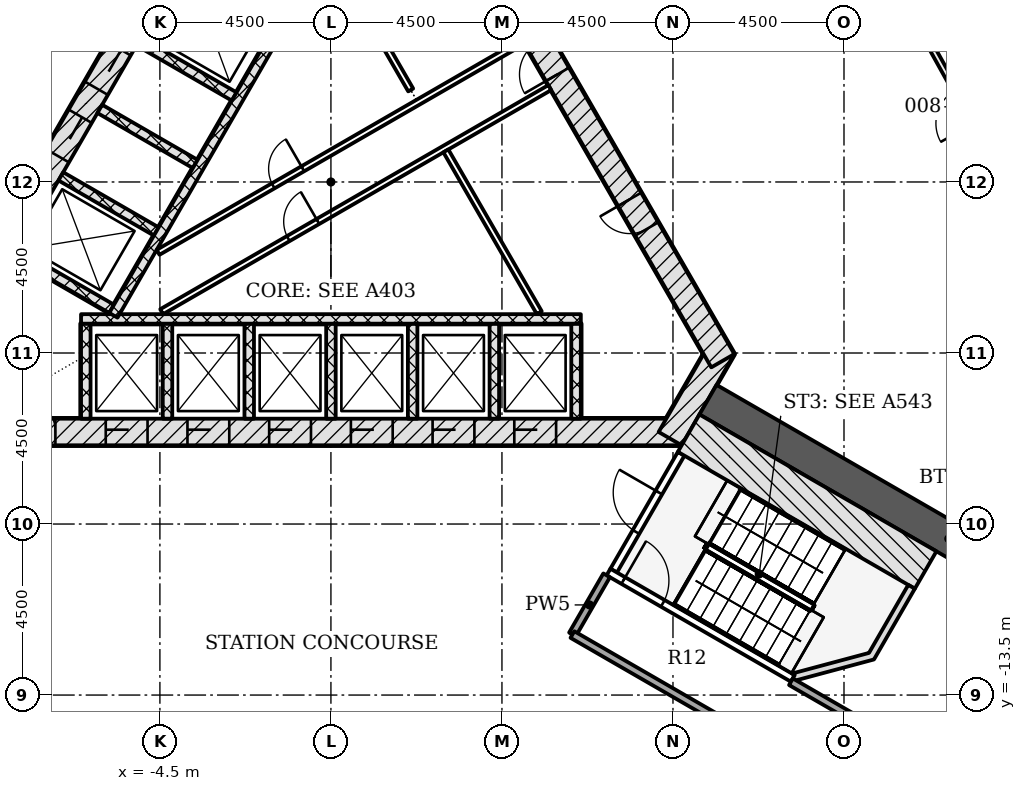
"""IFC4 building model, lengths in metres.
Left out: names, types, materials, properties, quantities, classifications, styles, units other than length and angle.
Written with IfcOpenShell. Run it as: python <this file> out.ifc"""

import sys

from ifc_helpers import new_model, si_unit, direction, frame, frame_2d, origin, place, context, subcontext, project, spatial, polyline, rectangle, outline, extrude, element, fill, save


model = new_model("IFC4")
c1 = context("Model", 3, precision=1e-05, world=origin(), true_north=direction((0.0, 1.0)))
c2 = subcontext(c1, "Body", "Model", "MODEL_VIEW")
j1 = project(units=[si_unit("LENGTHUNIT", "METRE"), si_unit("PLANEANGLEUNIT", "RADIAN")], contexts=[c1])
p1 = place(None, origin())
s1 = spatial("IfcSite", under=j1, at=p1, CompositionType="ELEMENT")
p2 = place(p1, origin())
s2 = spatial("IfcBuilding", under=s1, at=p2, CompositionType="ELEMENT")
p3 = place(p2, origin())
s3 = spatial("IfcBuildingStorey", under=s2, at=p3, CompositionType="ELEMENT", Elevation=0.0)
p4 = place(p3, frame((-9.229, -6.578, -0.25), z_axis=(0.0, 0.0, 1.0), x_axis=(1.0, 0.0, 0.0)))
e1 = element("IfcWall", 1, at=p4, inside=s3, PredefinedType="SHEAR", context=c2, shape_type="SweptSolid", body=[
    extrude(rectangle(XDim=18.458, YDim=0.7, at=frame_2d((9.229, 0.0))), origin(), (0.0, 0.0, 1.0), 6.0),
])
p5 = place(p4, frame((3.304, 0.0, 0.25)))
e2 = element("IfcOpeningElement", 2, at=p5, cuts=e1, PredefinedType="OPENING", context=c2, shape_type="SweptSolid", body=[
    extrude(rectangle(XDim=1.1, YDim=2.1, at=frame_2d((0.55, 1.05))), frame((0.0, 0.36, 0.0), z_axis=(0.0, -1.0, 0.0), x_axis=(1.0, 0.0, 0.0)), (0.0, 0.0, 1.0), 0.72),
])
p6 = place(p4, frame((5.454, 0.0, 0.25)))
e3 = element("IfcOpeningElement", 3, at=p6, cuts=e1, PredefinedType="OPENING", context=c2, shape_type="SweptSolid", body=[
    extrude(rectangle(XDim=1.1, YDim=2.1, at=frame_2d((0.55, 1.05))), frame((0.0, 0.36, 0.0), z_axis=(0.0, -1.0, 0.0), x_axis=(1.0, 0.0, 0.0)), (0.0, 0.0, 1.0), 0.72),
])
p7 = place(p4, frame((7.604, 0.0, 0.25)))
e4 = element("IfcOpeningElement", 4, at=p7, cuts=e1, PredefinedType="OPENING", context=c2, shape_type="SweptSolid", body=[
    extrude(rectangle(XDim=1.1, YDim=2.1, at=frame_2d((0.55, 1.05))), frame((0.0, 0.36, 0.0), z_axis=(0.0, -1.0, 0.0), x_axis=(1.0, 0.0, 0.0)), (0.0, 0.0, 1.0), 0.72),
])
p8 = place(p4, frame((9.754, 0.0, 0.25)))
e5 = element("IfcOpeningElement", 5, at=p8, cuts=e1, PredefinedType="OPENING", context=c2, shape_type="SweptSolid", body=[
    extrude(rectangle(XDim=1.1, YDim=2.1, at=frame_2d((0.55, 1.05))), frame((0.0, 0.36, 0.0), z_axis=(0.0, -1.0, 0.0), x_axis=(1.0, 0.0, 0.0)), (0.0, 0.0, 1.0), 0.72),
])
p9 = place(p4, frame((11.904, 0.0, 0.25)))
e6 = element("IfcOpeningElement", 6, at=p9, cuts=e1, PredefinedType="OPENING", context=c2, shape_type="SweptSolid", body=[
    extrude(rectangle(XDim=1.1, YDim=2.1, at=frame_2d((0.55, 1.05))), frame((0.0, 0.36, 0.0), z_axis=(0.0, -1.0, 0.0), x_axis=(1.0, 0.0, 0.0)), (0.0, 0.0, 1.0), 0.72),
])
p10 = place(p4, frame((14.054, 0.0, 0.25)))
e7 = element("IfcOpeningElement", 7, at=p10, cuts=e1, PredefinedType="OPENING", context=c2, shape_type="SweptSolid", body=[
    extrude(rectangle(XDim=1.1, YDim=2.1, at=frame_2d((0.55, 1.05))), frame((0.0, 0.36, 0.0), z_axis=(0.0, -1.0, 0.0), x_axis=(1.0, 0.0, 0.0)), (0.0, 0.0, 1.0), 0.72),
])
p11 = place(p4, frame((1.079, 0.0, 0.25)))
e8 = element("IfcOpeningElement", 8, at=p11, cuts=e1, PredefinedType="OPENING", context=c2, shape_type="SweptSolid", body=[
    extrude(rectangle(XDim=0.9, YDim=2.1, at=frame_2d((0.45, 1.05))), frame((0.0, 0.36, 0.0), z_axis=(0.0, -1.0, 0.0), x_axis=(1.0, 0.0, 0.0)), (0.0, 0.0, 1.0), 0.72),
])
p12 = place(p3, frame((8.926, -6.753, -0.25), z_axis=(0.0, 0.0, 1.0), x_axis=(0.500042739161, 0.866000726912, 0.0)))
e9 = element("IfcWall", 9, at=p12, inside=s3, PredefinedType="SHEAR", context=c2, shape_type="SweptSolid", body=[
    extrude(rectangle(XDim=2.771, YDim=0.7, at=frame_2d((1.386, 0.0))), origin(), (0.0, 0.0, 1.0), 6.0),
])
p13 = place(p3, frame((10.311, -4.703, -0.25), z_axis=(0.0, 0.0, 1.0), x_axis=(-0.500001446645, 0.866024568562, 0.0)))
e10 = element("IfcWall", 10, at=p13, inside=s3, PredefinedType="SHEAR", context=c2, shape_type="SweptSolid", body=[
    extrude(rectangle(XDim=18.458, YDim=0.7, at=frame_2d((9.229, 0.0))), origin(), (0.0, 0.0, 1.0), 6.0),
])
p14 = place(p13, frame((8.7, 0.0, 0.25)))
e11 = element("IfcOpeningElement", 11, at=p14, cuts=e10, PredefinedType="OPENING", context=c2, shape_type="SweptSolid", body=[
    extrude(rectangle(XDim=1.0, YDim=2.1, at=frame_2d((0.5, 1.05))), frame((0.0, 0.36, 0.0), z_axis=(0.0, -1.0, 0.0), x_axis=(1.0, 0.0, 0.0)), (0.0, 0.0, 1.0), 0.72),
])
p15 = place(p13, frame((4.002, 0.0, 0.25)))
e12 = element("IfcOpeningElement", 12, at=p15, cuts=e10, PredefinedType="OPENING", context=c2, shape_type="SweptSolid", body=[
    extrude(rectangle(XDim=0.9, YDim=2.1, at=frame_2d((0.45, 1.05))), frame((0.0, 0.36, 0.0), z_axis=(0.0, -1.0, 0.0), x_axis=(1.0, 0.0, 0.0)), (0.0, 0.0, 1.0), 0.72),
])
p16 = place(p13, frame((14.093, 0.0, 0.25)))
e13 = element("IfcOpeningElement", 13, at=p16, cuts=e10, PredefinedType="OPENING", context=c2, shape_type="SweptSolid", body=[
    extrude(rectangle(XDim=0.9, YDim=2.1, at=frame_2d((0.45, 1.05))), frame((0.0, 0.36, 0.0), z_axis=(0.0, -1.0, 0.0), x_axis=(1.0, 0.0, 0.0)), (0.0, 0.0, 1.0), 0.72),
])
p17 = place(p3, frame((-1.083, 11.281, -0.25), z_axis=(0.0, 0.0, 1.0), x_axis=(-0.500001446645, -0.866024568562, 0.0)))
e14 = element("IfcWall", 14, at=p17, inside=s3, PredefinedType="SHEAR", context=c2, shape_type="SweptSolid", body=[
    extrude(rectangle(XDim=18.458, YDim=0.7, at=frame_2d((9.229, 0.0))), origin(), (0.0, 0.0, 1.0), 6.0),
])
p18 = place(p17, frame((4.029, 0.0, 0.25)))
e15 = element("IfcOpeningElement", 15, at=p18, cuts=e14, PredefinedType="OPENING", context=c2, shape_type="SweptSolid", body=[
    extrude(rectangle(XDim=1.4, YDim=2.1, at=frame_2d((0.7, 1.05))), frame((0.0, 0.36, 0.0), z_axis=(0.0, -1.0, 0.0), x_axis=(1.0, 0.0, 0.0)), (0.0, 0.0, 1.0), 0.72),
])
p19 = place(p17, frame((6.579, 0.0, 0.25)))
e16 = element("IfcOpeningElement", 16, at=p19, cuts=e14, PredefinedType="OPENING", context=c2, shape_type="SweptSolid", body=[
    extrude(rectangle(XDim=1.4, YDim=2.1, at=frame_2d((0.7, 1.05))), frame((0.0, 0.36, 0.0), z_axis=(0.0, -1.0, 0.0), x_axis=(1.0, 0.0, 0.0)), (0.0, 0.0, 1.0), 0.72),
])
p20 = place(p17, frame((8.979, 0.0, 0.25)))
e17 = element("IfcOpeningElement", 17, at=p20, cuts=e14, PredefinedType="OPENING", context=c2, shape_type="SweptSolid", body=[
    extrude(rectangle(XDim=1.2, YDim=2.1, at=frame_2d((0.6, 1.05))), frame((0.0, 0.36, 0.0), z_axis=(0.0, -1.0, 0.0), x_axis=(1.0, 0.0, 0.0)), (0.0, 0.0, 1.0), 0.72),
])
p21 = place(p17, frame((11.029, 0.0, 0.25)))
e18 = element("IfcOpeningElement", 18, at=p21, cuts=e14, PredefinedType="OPENING", context=c2, shape_type="SweptSolid", body=[
    extrude(rectangle(XDim=1.2, YDim=2.1, at=frame_2d((0.6, 1.05))), frame((0.0, 0.36, 0.0), z_axis=(0.0, -1.0, 0.0), x_axis=(1.0, 0.0, 0.0)), (0.0, 0.0, 1.0), 0.72),
])
p22 = place(p17, frame((13.179, 0.0, 0.25)))
e19 = element("IfcOpeningElement", 19, at=p22, cuts=e14, PredefinedType="OPENING", context=c2, shape_type="SweptSolid", body=[
    extrude(rectangle(XDim=1.3, YDim=2.1, at=frame_2d((0.65, 1.05))), frame((0.0, 0.36, 0.0), z_axis=(0.0, -1.0, 0.0), x_axis=(1.0, 0.0, 0.0)), (0.0, 0.0, 1.0), 0.72),
])
p23 = place(p3, frame((9.922, -5.728, -0.25), z_axis=(0.0, 0.0, 1.0), x_axis=(0.866028046028, -0.499995423472, 0.0)))
e20 = element("IfcWall", 20, at=p23, inside=s3, PredefinedType="SHEAR", context=c2, shape_type="SweptSolid", body=[
    extrude(rectangle(XDim=14.633, YDim=0.9, at=frame_2d((7.316, 0.0))), origin(), (0.0, 0.0, 1.0), 6.0),
])
for number, where, z_axis, x_axis in (
    (21, (-6.45, -6.228, -0.25), (0.0, 0.0, 1.0), (0.0, 1.0, 0.0)),
    (22, (-4.3, -6.228, -0.25), (0.0, 0.0, 1.0), (0.0, 1.0, 0.0)),
    (23, (-2.15, -6.228, -0.25), (0.0, 0.0, 1.0), (0.0, 1.0, 0.0)),
    (24, (0.0, -6.228, -0.25), (0.0, 0.0, 1.0), (0.0, 1.0, 0.0)),
    (25, (2.15, -6.228, -0.25), (0.0, 0.0, 1.0), (0.0, 1.0, 0.0)),
    (26, (4.3, -6.228, -0.25), (0.0, 0.0, 1.0), (0.0, 1.0, 0.0)),
    (27, (6.45, -6.228, -0.25), (0.0, 0.0, 1.0), (0.0, 1.0, 0.0)),
):
    element("IfcWall", number, at=place(p3, frame(where, z_axis=z_axis, x_axis=x_axis)), inside=s3, PredefinedType="PARTITIONING", context=c2, shape_type="SweptSolid", body=[
        extrude(rectangle(XDim=2.5, YDim=0.25, at=frame_2d((1.25, 0.0))), origin(), (0.0, 0.0, 1.0), 6.0),
    ])
p24 = place(p3, frame((-6.575, -3.603, 0.0), z_axis=(0.0, 0.0, 1.0), x_axis=(1.0, 0.0, 0.0)))
e28 = element("IfcWall", 28, at=p24, inside=s3, PredefinedType="PARTITIONING", context=c2, shape_type="SweptSolid", body=[
    extrude(rectangle(XDim=13.15, YDim=0.25, at=frame_2d((6.575, 0.0))), origin(), (0.0, 0.0, 1.0), 5.75),
])
for number, where, z_axis, x_axis in (
    (29, (-5.056, 3.699, -0.25), (0.0, 0.0, 1.0), (0.866, -0.5, 0.0)),
    (30, (-6.081, 1.923, -0.25), (0.0, 0.0, 1.0), (0.866, -0.5, 0.0)),
    (31, (-7.106, 0.148, -0.25), (0.0, 0.0, 1.0), (0.866, -0.5, 0.0)),
    (32, (-8.281, -1.887, -0.25), (0.0, 0.0, 1.0), (0.866, -0.5, 0.0)),
):
    element("IfcWall", number, at=place(p3, frame(where, z_axis=z_axis, x_axis=x_axis)), inside=s3, PredefinedType="PARTITIONING", context=c2, shape_type="SweptSolid", body=[
        extrude(rectangle(XDim=2.9, YDim=0.25, at=frame_2d((1.45, 0.0))), origin(), (0.0, 0.0, 1.0), 6.0),
    ])
p25 = place(p3, frame((0.176, 6.711, 0.0), z_axis=(0.0, 0.0, 1.0), x_axis=(-0.500004227369, -0.866022963098, 0.0)))
e33 = element("IfcWall", 33, at=p25, inside=s3, PredefinedType="PARTITIONING", context=c2, shape_type="SweptSolid", body=[
    extrude(rectangle(XDim=11.8, YDim=0.25, at=frame_2d((5.9, 0.0))), origin(), (0.0, 0.0, 1.0), 5.75),
])
p26 = place(p3, frame((-4.548, -1.851, 0.0), z_axis=(0.0, 0.0, 1.0), x_axis=(0.866023939251, 0.500002536638, 0.0)))
e34 = element("IfcWall", 34, at=p26, inside=s3, PredefinedType="PARTITIONING", context=c2, shape_type="SweptSolid", body=[
    extrude(rectangle(XDim=11.092, YDim=0.15, at=frame_2d((5.546, 0.0))), origin(), (0.0, 0.0, 1.0), 5.75),
])
p27 = place(p26, frame((3.497, 0.0, 0.0)))
e35 = element("IfcOpeningElement", 35, at=p27, cuts=e34, PredefinedType="OPENING", context=c2, shape_type="SweptSolid", body=[
    extrude(rectangle(XDim=0.9, YDim=2.1, at=frame_2d((0.45, 1.05))), frame((0.0, 0.085, 0.0), z_axis=(0.0, -1.0, 0.0), x_axis=(1.0, 0.0, 0.0)), (0.0, 0.0, 1.0), 0.17),
])
p28 = place(p3, frame((2.099, 2.42, 0.0), z_axis=(0.0, 0.0, 1.0), x_axis=(-0.499998449073, 0.866026299211, 0.0)))
e36 = element("IfcWall", 36, at=p28, inside=s3, PredefinedType="PARTITIONING", context=c2, shape_type="SweptSolid", body=[
    extrude(rectangle(XDim=4.211, YDim=0.15, at=frame_2d((2.106, 0.0))), origin(), (0.0, 0.0, 1.0), 5.75),
])
p29 = place(p3, frame((-4.454, -3.413, 0.0), z_axis=(0.0, 0.0, 1.0), x_axis=(0.86603043987, 0.499991277142, 0.0)))
e37 = element("IfcWall", 37, at=p29, inside=s3, PredefinedType="PARTITIONING", context=c2, shape_type="SweptSolid", body=[
    extrude(rectangle(XDim=11.792, YDim=0.15, at=frame_2d((5.896, 0.0))), origin(), (0.0, 0.0, 1.0), 5.75),
])
p30 = place(p29, frame((3.847, 0.0, 0.0)))
e38 = element("IfcOpeningElement", 38, at=p30, cuts=e37, PredefinedType="OPENING", context=c2, shape_type="SweptSolid", body=[
    extrude(rectangle(XDim=0.9, YDim=2.1, at=frame_2d((0.45, 1.05))), frame((0.0, 0.085, 0.0), z_axis=(0.0, -1.0, 0.0), x_axis=(1.0, 0.0, 0.0)), (0.0, 0.0, 1.0), 0.17),
])
p31 = place(p3, frame((5.482, -3.439, 0.0), z_axis=(0.0, 0.0, 1.0), x_axis=(-0.500006183238, 0.866021833861, 0.0)))
e39 = element("IfcWall", 39, at=p31, inside=s3, PredefinedType="PARTITIONING", context=c2, shape_type="SweptSolid", body=[
    extrude(rectangle(XDim=4.916, YDim=0.15, at=frame_2d((2.458, 0.0))), origin(), (0.0, 0.0, 1.0), 5.75),
])
p32 = place(p3, frame((7.44, -10.226, -0.25), z_axis=(0.0, 0.0, 1.0), x_axis=(0.500022077904, 0.866012656725, 0.0)))
e40 = element("IfcWall", 40, at=p32, inside=s3, PredefinedType="SHEAR", context=c2, shape_type="SweptSolid", body=[
    extrude(rectangle(XDim=3.55, YDim=0.2, at=frame_2d((1.775, 0.0))), origin(), (0.0, 0.0, 1.0), 6.0),
])
p33 = place(p32, frame((1.175, 0.0, 0.25)))
e41 = element("IfcOpeningElement", 41, at=p33, cuts=e40, PredefinedType="OPENING", context=c2, shape_type="SweptSolid", body=[
    extrude(rectangle(XDim=1.2, YDim=2.1, at=frame_2d((0.6, 1.05))), frame((0.0, 0.11, 0.0), z_axis=(0.0, -1.0, 0.0), x_axis=(1.0, 0.0, 0.0)), (0.0, 0.0, 1.0), 0.22),
])
p34 = place(p3, frame((7.304, -10.262, -0.25), z_axis=(0.0, 0.0, 1.0), x_axis=(0.866026594901, -0.49999793692, 0.0)))
e42 = element("IfcWall", 42, at=p34, inside=s3, PredefinedType="SHEAR", context=c2, shape_type="SweptSolid", body=[
    extrude(rectangle(XDim=5.6, YDim=0.2, at=frame_2d((2.8, 0.0))), origin(), (0.0, 0.0, 1.0), 6.0),
])
p35 = place(p34, frame((0.45, 0.0, 0.25)))
e43 = element("IfcOpeningElement", 43, at=p35, cuts=e42, PredefinedType="OPENING", context=c2, shape_type="SweptSolid", body=[
    extrude(rectangle(XDim=1.2, YDim=2.1, at=frame_2d((0.6, 1.05))), frame((0.0, 0.11, 0.0), z_axis=(0.0, -1.0, 0.0), x_axis=(1.0, 0.0, 0.0)), (0.0, 0.0, 1.0), 0.22),
])
p36 = place(p3, frame((9.413, -6.61, -0.25), z_axis=(0.0, 0.0, 1.0), x_axis=(0.866018442252, -0.500012057535, 0.0)))
e44 = element("IfcWall", 44, at=p36, inside=s3, PredefinedType="SHEAR", context=c2, shape_type="SweptSolid", body=[
    extrude(rectangle(XDim=7.2, YDim=1.136, at=frame_2d((3.6, 0.0))), origin(), (0.0, 0.0, 1.0), 6.0),
])
p37 = place(p3, frame((0.0, 0.0, -0.25)))
e45 = element("IfcWall", 45, at=p37, inside=s3, PredefinedType="SHEAR", context=c2, shape_type="SweptSolid", body=[
    extrude(outline(polyline([(12.104, -13.149), (14.289, -12.563), (15.364, -10.701), (15.191, -10.601), (14.157, -12.392), (12.132, -12.934), (12.204, -12.976), (12.204, -12.976), (12.204, -12.976), (12.204, -12.976), (12.204, -12.976), (12.204, -12.976), (12.204, -12.976), (12.204, -12.976), (12.204, -12.976), (12.204, -12.976), (12.204, -12.976), (12.204, -12.976), (12.204, -12.976), (12.204, -12.976), (12.204, -12.976), (12.204, -12.976), (12.204, -12.976), (12.104, -13.149)])), origin(), (0.0, 0.0, 1.0), 6.0),
])
p38 = place(p3, frame((7.254, -10.35, 0.0), z_axis=(0.0, 0.0, 1.0), x_axis=(-0.50043140051, -0.865776191278, 0.0)))
e46 = element("IfcWall", 46, at=p38, inside=s3, PredefinedType="PARTITIONING", context=c2, shape_type="SweptSolid", body=[
    extrude(rectangle(XDim=1.798, YDim=0.2, at=frame_2d((0.899, 0.0))), origin(), (0.0, 0.0, 1.0), 5.75),
])
p39 = place(p3, frame((6.354, -11.908, 0.0), z_axis=(0.0, 0.0, 1.0), x_axis=(0.866091720682, -0.499885118168, 0.0)))
e47 = element("IfcWall", 47, at=p39, inside=s3, PredefinedType="PARTITIONING", context=c2, shape_type="SweptSolid", body=[
    extrude(rectangle(XDim=6.799, YDim=0.2, at=frame_2d((3.4, 0.0))), origin(), (0.0, 0.0, 1.0), 5.138),
])
p40 = place(p3, frame((25.166, -20.691, 0.0), z_axis=(0.0, 0.0, 1.0), x_axis=(-0.866035175108, 0.499983075189, 0.0)))
e48 = element("IfcWall", 48, at=p40, inside=s3, PredefinedType="PARTITIONING", context=c2, shape_type="SweptSolid", body=[
    extrude(rectangle(XDim=15.083, YDim=0.2, at=frame_2d((7.541, 0.0))), origin(), (0.0, 0.0, 1.0), 5.133),
])
p41 = place(p3, frame((17.77, 0.012, 0.0), z_axis=(0.0, 0.0, 1.0), x_axis=(-0.486499058613, 0.873681100842, 0.0)))
e49 = element("IfcWall", 49, at=p41, inside=s3, PredefinedType="PARTITIONING", context=c2, shape_type="SweptSolid", body=[
    extrude(rectangle(XDim=4.43, YDim=0.15, at=frame_2d((2.215, 0.0))), origin(), (0.0, 0.0, 1.0), 5.138),
])
p42 = place(p41, frame((1.75, 0.0, 0.0)))
e50 = element("IfcOpeningElement", 50, at=p42, cuts=e49, PredefinedType="OPENING", context=c2, shape_type="SweptSolid", body=[
    extrude(rectangle(XDim=1.0, YDim=2.1, at=frame_2d((0.5, 1.05))), frame((0.0, 0.085, 0.0), z_axis=(0.0, -1.0, 0.0), x_axis=(1.0, 0.0, 0.0)), (0.0, 0.0, 1.0), 0.17),
])
p43 = place(p5, origin())
e51 = element("IfcDoor", 51, at=p43, inside=s3, OperationType="DOUBLE_DOOR_SLIDING", PredefinedType="DOOR", context=c2, shape_type="SweptSolid", body=[
    extrude(rectangle(XDim=1.1, YDim=2.1, at=frame_2d((0.55, 1.05))), frame((0.0, 0.025, 0.0), z_axis=(0.0, -1.0, 0.0), x_axis=(1.0, 0.0, 0.0)), (0.0, 0.0, 1.0), 0.05),
])
fill(e2, e51)
p44 = place(p6, origin())
e52 = element("IfcDoor", 52, at=p44, inside=s3, OperationType="DOUBLE_DOOR_SLIDING", PredefinedType="DOOR", context=c2, shape_type="SweptSolid", body=[
    extrude(rectangle(XDim=1.1, YDim=2.1, at=frame_2d((0.55, 1.05))), frame((0.0, 0.025, 0.0), z_axis=(0.0, -1.0, 0.0), x_axis=(1.0, 0.0, 0.0)), (0.0, 0.0, 1.0), 0.05),
])
fill(e3, e52)
p45 = place(p7, origin())
e53 = element("IfcDoor", 53, at=p45, inside=s3, OperationType="DOUBLE_DOOR_SLIDING", PredefinedType="DOOR", context=c2, shape_type="SweptSolid", body=[
    extrude(rectangle(XDim=1.1, YDim=2.1, at=frame_2d((0.55, 1.05))), frame((0.0, 0.025, 0.0), z_axis=(0.0, -1.0, 0.0), x_axis=(1.0, 0.0, 0.0)), (0.0, 0.0, 1.0), 0.05),
])
fill(e4, e53)
p46 = place(p8, origin())
e54 = element("IfcDoor", 54, at=p46, inside=s3, OperationType="DOUBLE_DOOR_SLIDING", PredefinedType="DOOR", context=c2, shape_type="SweptSolid", body=[
    extrude(rectangle(XDim=1.1, YDim=2.1, at=frame_2d((0.55, 1.05))), frame((0.0, 0.025, 0.0), z_axis=(0.0, -1.0, 0.0), x_axis=(1.0, 0.0, 0.0)), (0.0, 0.0, 1.0), 0.05),
])
fill(e5, e54)
p47 = place(p9, origin())
e55 = element("IfcDoor", 55, at=p47, inside=s3, OperationType="DOUBLE_DOOR_SLIDING", PredefinedType="DOOR", context=c2, shape_type="SweptSolid", body=[
    extrude(rectangle(XDim=1.1, YDim=2.1, at=frame_2d((0.55, 1.05))), frame((0.0, 0.025, 0.0), z_axis=(0.0, -1.0, 0.0), x_axis=(1.0, 0.0, 0.0)), (0.0, 0.0, 1.0), 0.05),
])
fill(e6, e55)
p48 = place(p10, origin())
e56 = element("IfcDoor", 56, at=p48, inside=s3, OperationType="DOUBLE_DOOR_SLIDING", PredefinedType="DOOR", context=c2, shape_type="SweptSolid", body=[
    extrude(rectangle(XDim=1.1, YDim=2.1, at=frame_2d((0.55, 1.05))), frame((0.0, 0.025, 0.0), z_axis=(0.0, -1.0, 0.0), x_axis=(1.0, 0.0, 0.0)), (0.0, 0.0, 1.0), 0.05),
])
fill(e7, e56)
p49 = place(p20, origin())
e57 = element("IfcDoor", 57, at=p49, inside=s3, OperationType="DOUBLE_DOOR_SLIDING", PredefinedType="DOOR", context=c2, shape_type="SweptSolid", body=[
    extrude(rectangle(XDim=1.2, YDim=2.1, at=frame_2d((0.6, 1.05))), frame((0.0, 0.025, 0.0), z_axis=(0.0, -1.0, 0.0), x_axis=(1.0, 0.0, 0.0)), (0.0, 0.0, 1.0), 0.05),
])
fill(e17, e57)
p50 = place(p21, origin())
e58 = element("IfcDoor", 58, at=p50, inside=s3, OperationType="DOUBLE_DOOR_SLIDING", PredefinedType="DOOR", context=c2, shape_type="SweptSolid", body=[
    extrude(rectangle(XDim=1.2, YDim=2.1, at=frame_2d((0.6, 1.05))), frame((0.0, 0.025, 0.0), z_axis=(0.0, -1.0, 0.0), x_axis=(1.0, 0.0, 0.0)), (0.0, 0.0, 1.0), 0.05),
])
fill(e18, e58)
p51 = place(p14, origin())
e59 = element("IfcDoor", 59, at=p51, inside=s3, OperationType="SINGLE_SWING_LEFT", PredefinedType="DOOR", context=c2, shape_type="SweptSolid", body=[
    extrude(rectangle(XDim=1.0, YDim=2.1, at=frame_2d((0.5, 1.05))), frame((0.0, 0.075, 0.0), z_axis=(0.0, -1.0, 0.0), x_axis=(1.0, 0.0, 0.0)), (0.0, 0.0, 1.0), 0.15),
])
fill(e11, e59)
p52 = place(p15, origin())
e60 = element("IfcDoor", 60, at=p52, inside=s3, OperationType="SINGLE_SWING_RIGHT", PredefinedType="DOOR", context=c2, shape_type="SweptSolid", body=[
    extrude(rectangle(XDim=0.9, YDim=2.1, at=frame_2d((0.45, 1.05))), frame((0.0, 0.075, 0.0), z_axis=(0.0, -1.0, 0.0), x_axis=(1.0, 0.0, 0.0)), (0.0, 0.0, 1.0), 0.15),
])
fill(e12, e60)
p53 = place(p30, origin())
e61 = element("IfcDoor", 61, at=p53, inside=s3, OperationType="SINGLE_SWING_RIGHT", PredefinedType="DOOR", context=c2, shape_type="SweptSolid", body=[
    extrude(rectangle(XDim=0.9, YDim=2.1, at=frame_2d((0.45, 1.05))), frame((0.0, 0.025, 0.0), z_axis=(0.0, -1.0, 0.0), x_axis=(1.0, 0.0, 0.0)), (0.0, 0.0, 1.0), 0.05),
])
fill(e38, e61)
p54 = place(p11, origin())
e62 = element("IfcDoor", 62, at=p54, inside=s3, OperationType="SINGLE_SWING_LEFT", PredefinedType="DOOR", context=c2, shape_type="SweptSolid", body=[
    extrude(rectangle(XDim=0.9, YDim=2.1, at=frame_2d((0.45, 1.05))), frame((0.0, 0.075, 0.0), z_axis=(0.0, -1.0, 0.0), x_axis=(1.0, 0.0, 0.0)), (0.0, 0.0, 1.0), 0.15),
])
fill(e8, e62)
p55 = place(p27, origin())
e63 = element("IfcDoor", 63, at=p55, inside=s3, OperationType="SINGLE_SWING_RIGHT", PredefinedType="DOOR", context=c2, shape_type="SweptSolid", body=[
    extrude(rectangle(XDim=0.9, YDim=2.1, at=frame_2d((0.45, 1.05))), frame((0.0, 0.025, 0.0), z_axis=(0.0, -1.0, 0.0), x_axis=(1.0, 0.0, 0.0)), (0.0, 0.0, 1.0), 0.05),
])
fill(e35, e63)
p56 = place(p33, origin())
e64 = element("IfcDoor", 64, at=p56, inside=s3, OperationType="SINGLE_SWING_RIGHT", PredefinedType="DOOR", context=c2, shape_type="SweptSolid", body=[
    extrude(rectangle(XDim=1.2, YDim=2.1, at=frame_2d((0.6, 1.05))), frame((0.0, 0.025, 0.0), z_axis=(0.0, -1.0, 0.0), x_axis=(1.0, 0.0, 0.0)), (0.0, 0.0, 1.0), 0.05),
])
fill(e41, e64)
p57 = place(p35, origin())
e65 = element("IfcDoor", 65, at=p57, inside=s3, OperationType="SINGLE_SWING_LEFT", PredefinedType="DOOR", context=c2, shape_type="SweptSolid", body=[
    extrude(rectangle(XDim=1.2, YDim=2.1, at=frame_2d((0.6, 1.05))), frame((0.0, 0.025, 0.0), z_axis=(0.0, -1.0, 0.0), x_axis=(1.0, 0.0, 0.0)), (0.0, 0.0, 1.0), 0.05),
])
fill(e43, e65)
save(model, sys.argv[1])
